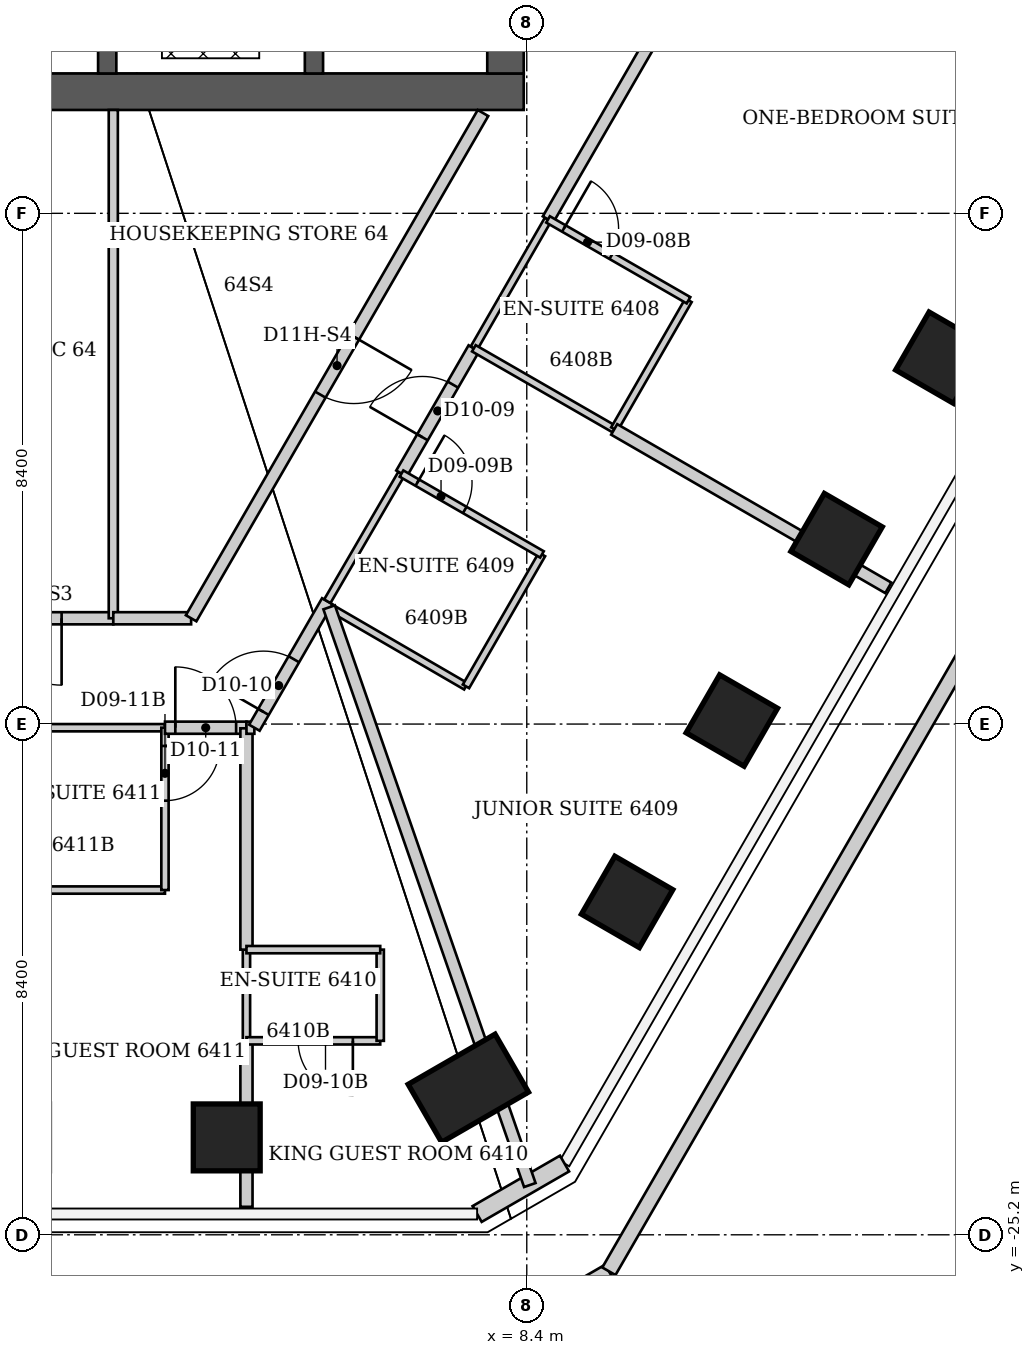
"""IFC4 building model, lengths in metres.
Left out: names, types, materials, properties, quantities, classifications, styles, units other than length and angle.
Written with IfcOpenShell. Run it as: python <this file> out.ifc"""

import sys

from ifc_helpers import new_model, si_unit, direction, frame, frame_2d, origin, origin_2d, place, context, subcontext, project, spatial, rectangle, extrude, clip, halfspace, element, fill, save


model = new_model("IFC4")
c1 = context("Model", 3, precision=1e-05, world=origin(), true_north=direction((0.0, 1.0)))
c2 = subcontext(c1, "Body", "Model", "MODEL_VIEW")
j1 = project(units=[si_unit("LENGTHUNIT", "METRE"), si_unit("PLANEANGLEUNIT", "RADIAN")], contexts=[c1])
p1 = place(None, origin())
s1 = spatial("IfcSite", under=j1, at=p1, CompositionType="ELEMENT")
p2 = place(p1, origin())
s2 = spatial("IfcBuilding", under=s1, at=p2, CompositionType="ELEMENT")
p3 = place(p2, frame((0.0, 0.0, 257.0)))
s3 = spatial("IfcBuildingStorey", under=s2, at=p3, CompositionType="ELEMENT", Elevation=257.0)
p4 = place(p3, frame((15.218, -10.775, -0.045), z_axis=(0.0, 0.0, 1.0), x_axis=(0.866025403784, -0.5, 0.0)))
e1 = element("IfcColumn", 1, at=p4, inside=s3, PredefinedType="COLUMN", context=c2, shape_type="SweptSolid", body=[
    clip(extrude(rectangle(XDim=1.1, YDim=1.1, at=origin_2d()), origin(), (0.0, 0.0, 1.0), 3.845), halfspace(frame((0.0, 0.0, 0.045)), True)),
])
p5 = place(p3, frame((13.495, -13.759, -0.052), z_axis=(0.0, 0.0, 1.0), x_axis=(0.866025403784, -0.5, 0.0)))
e2 = element("IfcColumn", 2, at=p5, inside=s3, PredefinedType="COLUMN", context=c2, shape_type="SweptSolid", body=[
    clip(extrude(rectangle(XDim=1.1, YDim=1.1, at=origin_2d()), origin(), (0.0, 0.0, 1.0), 3.852), halfspace(frame((0.0, 0.0, 0.052)), True)),
])
p6 = place(p3, frame((11.773, -16.742, -0.06), z_axis=(0.0, 0.0, 1.0), x_axis=(0.866025403784, -0.5, 0.0)))
e3 = element("IfcColumn", 3, at=p6, inside=s3, PredefinedType="COLUMN", context=c2, shape_type="SweptSolid", body=[
    clip(extrude(rectangle(XDim=1.1, YDim=1.1, at=origin_2d()), origin(), (0.0, 0.0, 1.0), 3.86), halfspace(frame((0.0, 0.0, 0.06)), True)),
])
p7 = place(p3, frame((10.05, -19.725, -0.067), z_axis=(0.0, 0.0, 1.0), x_axis=(0.866025403784, -0.5, 0.0)))
e4 = element("IfcColumn", 4, at=p7, inside=s3, PredefinedType="COLUMN", context=c2, shape_type="SweptSolid", body=[
    clip(extrude(rectangle(XDim=1.1, YDim=1.1, at=origin_2d()), origin(), (0.0, 0.0, 1.0), 3.867), halfspace(frame((0.0, 0.0, 0.067)), True)),
])
p8 = place(p3, frame((7.439, -22.79, -0.069), z_axis=(0.0, 0.0, 1.0), x_axis=(0.5, -0.866025403784, 0.0)))
e5 = element("IfcColumn", 5, at=p8, inside=s3, PredefinedType="COLUMN", context=c2, shape_type="SweptSolid", body=[
    clip(extrude(rectangle(XDim=1.1, YDim=1.65, at=origin_2d()), origin(), (0.0, 0.0, 1.0), 3.869), halfspace(frame((0.0, 0.0, 0.069)), True)),
])
p9 = place(p3, frame((3.466, -23.598, -0.059), z_axis=(0.0, 0.0, 1.0), x_axis=(0.0, -1.0, 0.0)))
e6 = element("IfcColumn", 6, at=p9, inside=s3, PredefinedType="COLUMN", context=c2, shape_type="SweptSolid", body=[
    clip(extrude(rectangle(XDim=1.1, YDim=1.1, at=origin_2d()), origin(), (0.0, 0.0, 1.0), 3.859), halfspace(frame((0.0, 0.0, 0.059)), True)),
])
p10 = place(p3, frame((-8.35, -6.4, 0.0), z_axis=(0.0, 0.0, 1.0), x_axis=(1.0, 0.0, 0.0)))
e7 = element("IfcWall", 7, at=p10, inside=s3, PredefinedType="SHEAR", context=c2, shape_type="SweptSolid", body=[
    extrude(rectangle(XDim=16.7, YDim=0.6, at=frame_2d((8.35, 0.0))), origin(), (0.0, 0.0, 1.0), 3.8),
])
p11 = place(p3, frame((8.05, -6.1, 0.0), z_axis=(0.0, 0.0, 1.0), x_axis=(0.0, 1.0, 0.0)))
e8 = element("IfcWall", 8, at=p11, inside=s3, PredefinedType="SHEAR", context=c2, shape_type="SweptSolid", body=[
    extrude(rectangle(XDim=12.2, YDim=0.6, at=frame_2d((6.1, 0.0))), origin(), (0.0, 0.0, 1.0), 3.8),
])
p12 = place(p11, frame((7.6, 0.0, 0.0)))
e9 = element("IfcOpeningElement", 9, at=p12, cuts=e8, PredefinedType="OPENING", context=c2, shape_type="SweptSolid", body=[
    extrude(rectangle(XDim=1.2, YDim=2.2, at=frame_2d((0.6, 1.1))), frame((0.0, 0.3, 0.0), z_axis=(0.0, -1.0, 0.0), x_axis=(1.0, 0.0, 0.0)), (0.0, 0.0, 1.0), 0.6),
])
for number, where, z_axis, x_axis in (
    (10, (1.5, -6.1, 0.0), (0.0, 0.0, 1.0), (0.0, 1.0, 0.0)),
    (11, (4.9, -6.1, 0.0), (0.0, 0.0, 1.0), (0.0, 1.0, 0.0)),
):
    element("IfcWall", number, at=place(p3, frame(where, z_axis=z_axis, x_axis=x_axis)), inside=s3, PredefinedType="SHEAR", context=c2, shape_type="SweptSolid", body=[
        extrude(rectangle(XDim=7.2, YDim=0.3, at=frame_2d((3.6, 0.0))), origin(), (0.0, 0.0, 1.0), 3.8),
    ])
p13 = place(p3, frame((9.021, -24.028, 0.0), z_axis=(0.0, 0.0, 1.0), x_axis=(-0.865989634427, -0.500061949227, 0.0)))
e12 = element("IfcWall", 12, at=p13, inside=s3, PredefinedType="SOLIDWALL", context=c2, shape_type="SweptSolid", body=[
    extrude(rectangle(XDim=1.66, YDim=0.3, at=frame_2d((0.83, 0.0))), origin(), (0.0, 0.0, 1.0), 3.64),
])
p14 = place(p3, frame((8.226, -26.682, 0.0), z_axis=(0.0, 0.0, 1.0), x_axis=(0.865508535391, 0.500894175615, 0.0)))
e13 = element("IfcWall", 13, at=p14, inside=s3, PredefinedType="PARAPET", context=c2, shape_type="SweptSolid", body=[
    extrude(rectangle(XDim=1.761, YDim=0.25, at=frame_2d((0.88, 0.0))), origin(), (0.0, 0.0, 1.0), 1.1),
])
p15 = place(p3, frame((9.75, -25.8, 0.0), z_axis=(0.0, 0.0, 1.0), x_axis=(0.499998496786, 0.866026271663, 0.0)))
e14 = element("IfcWall", 14, at=p15, inside=s3, PredefinedType="PARAPET", context=c2, shape_type="SweptSolid", body=[
    extrude(rectangle(XDim=34.936, YDim=0.25, at=frame_2d((17.468, 0.0))), origin(), (0.0, 0.0, 1.0), 1.1),
])
for number, where, z_axis, x_axis in (
    (15, (0.0, -19.53, 0.0), (0.0, 0.0, 1.0), (1.0, 0.0, 0.0)),
    (16, (0.0, -16.86, 0.0), (0.0, 0.0, 1.0), (1.0, 0.0, 0.0)),
):
    element("IfcWall", number, at=place(p3, frame(where, z_axis=z_axis, x_axis=x_axis)), inside=s3, PredefinedType="PARTITIONING", context=c2, shape_type="SweptSolid", body=[
        extrude(rectangle(XDim=2.45, YDim=0.12, at=frame_2d((1.225, 0.0))), origin(), (0.0, 0.0, 1.0), 3.64),
    ])
p16 = place(p3, frame((1.6, -15.06, 0.0), z_axis=(0.0, 0.0, 1.0), x_axis=(-1.0, 0.0, 0.0)))
e17 = element("IfcWall", 17, at=p16, inside=s3, PredefinedType="PARTITIONING", context=c2, shape_type="SweptSolid", body=[
    extrude(rectangle(XDim=2.8, YDim=0.2, at=frame_2d((1.4, 0.0))), origin(), (0.0, 0.0, 1.0), 3.64),
])
p17 = place(p16, frame((0.85, 0.0, 0.0)))
e18 = element("IfcOpeningElement", 18, at=p17, cuts=e17, PredefinedType="OPENING", context=c2, shape_type="SweptSolid", body=[
    extrude(rectangle(XDim=1.1, YDim=2.2, at=frame_2d((0.55, 1.1))), frame((0.0, 0.1, 0.0), z_axis=(0.0, -1.0, 0.0), x_axis=(1.0, 0.0, 0.0)), (0.0, 0.0, 1.0), 0.2),
])
p18 = place(p3, frame((1.6, -6.7, 0.0), z_axis=(0.0, 0.0, 1.0), x_axis=(0.0, -1.0, 0.0)))
e19 = element("IfcWall", 19, at=p18, inside=s3, PredefinedType="PARTITIONING", context=c2, shape_type="SweptSolid", body=[
    extrude(rectangle(XDim=8.36, YDim=0.15, at=frame_2d((4.18, 0.0))), origin(), (0.0, 0.0, 1.0), 2.86),
])
p19 = place(p3, frame((2.45, -19.53, 0.0), z_axis=(0.0, 0.0, 1.0), x_axis=(0.0, 1.0, 0.0)))
e20 = element("IfcWall", 20, at=p19, inside=s3, PredefinedType="PARTITIONING", context=c2, shape_type="SweptSolid", body=[
    extrude(rectangle(XDim=2.67, YDim=0.12, at=frame_2d((1.335, 0.0))), origin(), (0.0, 0.0, 1.0), 3.64),
])
p20 = place(p19, frame((1.47, 0.0, 0.0)))
e21 = element("IfcOpeningElement", 21, at=p20, cuts=e20, PredefinedType="OPENING", context=c2, shape_type="SweptSolid", body=[
    extrude(rectangle(XDim=0.9, YDim=2.03, at=frame_2d((0.45, 1.015))), frame((0.0, 0.06, 0.0), z_axis=(0.0, -1.0, 0.0), x_axis=(1.0, 0.0, 0.0)), (0.0, 0.0, 1.0), 0.12),
])
p21 = place(p3, frame((2.45, -16.86, 0.0), z_axis=(0.0, 0.0, 1.0), x_axis=(1.0, 0.0, 0.0)))
e22 = element("IfcWall", 22, at=p21, inside=s3, PredefinedType="PARTITIONING", context=c2, shape_type="SweptSolid", body=[
    extrude(rectangle(XDim=1.34, YDim=0.2, at=frame_2d((0.67, 0.0))), origin(), (0.0, 0.0, 1.0), 3.64),
])
p22 = place(p21, frame((0.17, 0.0, 0.0)))
e23 = element("IfcOpeningElement", 23, at=p22, cuts=e22, PredefinedType="OPENING", context=c2, shape_type="SweptSolid", body=[
    extrude(rectangle(XDim=1.0, YDim=2.13, at=frame_2d((0.5, 1.065))), frame((0.0, 0.1, 0.0), z_axis=(0.0, -1.0, 0.0), x_axis=(1.0, 0.0, 0.0)), (0.0, 0.0, 1.0), 0.2),
])
p23 = place(p3, frame((2.88, -15.06, 0.0), z_axis=(0.0, 0.0, 1.0), x_axis=(-1.0, 0.0, 0.0)))
e24 = element("IfcWall", 24, at=p23, inside=s3, PredefinedType="PARTITIONING", context=c2, shape_type="SweptSolid", body=[
    extrude(rectangle(XDim=1.28, YDim=0.2, at=frame_2d((0.64, 0.0))), origin(), (0.0, 0.0, 1.0), 3.64),
])
p24 = place(p3, frame((3.79, -24.74, 0.0), z_axis=(0.0, 0.0, 1.0), x_axis=(0.0, 1.0, 0.0)))
e25 = element("IfcWall", 25, at=p24, inside=s3, PredefinedType="PARTITIONING", context=c2, shape_type="SweptSolid", body=[
    extrude(rectangle(XDim=2.73, YDim=0.2, at=frame_2d((1.365, 0.0))), origin(), (0.0, 0.0, 1.0), 3.64),
])
p25 = place(p3, frame((3.79, -22.01, 0.0), z_axis=(0.0, 0.0, 1.0), x_axis=(0.0, 1.0, 0.0)))
e26 = element("IfcWall", 26, at=p25, inside=s3, PredefinedType="PARTITIONING", context=c2, shape_type="SweptSolid", body=[
    extrude(rectangle(XDim=1.5, YDim=0.12, at=frame_2d((0.75, 0.0))), origin(), (0.0, 0.0, 1.0), 3.64),
])
p26 = place(p3, frame((3.79, -22.01, 0.0), z_axis=(0.0, 0.0, 1.0), x_axis=(1.0, 0.0, 0.0)))
e27 = element("IfcWall", 27, at=p26, inside=s3, PredefinedType="PARTITIONING", context=c2, shape_type="SweptSolid", body=[
    extrude(rectangle(XDim=2.2, YDim=0.12, at=frame_2d((1.1, 0.0))), origin(), (0.0, 0.0, 1.0), 3.64),
])
p27 = place(p26, frame((0.85, 0.0, 0.0)))
e28 = element("IfcOpeningElement", 28, at=p27, cuts=e27, PredefinedType="OPENING", context=c2, shape_type="SweptSolid", body=[
    extrude(rectangle(XDim=0.9, YDim=2.03, at=frame_2d((0.45, 1.015))), frame((0.0, 0.06, 0.0), z_axis=(0.0, -1.0, 0.0), x_axis=(1.0, 0.0, 0.0)), (0.0, 0.0, 1.0), 0.12),
])
p28 = place(p3, frame((3.79, -20.51, 0.0), z_axis=(0.0, 0.0, 1.0), x_axis=(0.0, 1.0, 0.0)))
e29 = element("IfcWall", 29, at=p28, inside=s3, PredefinedType="PARTITIONING", context=c2, shape_type="SweptSolid", body=[
    extrude(rectangle(XDim=3.64, YDim=0.2, at=frame_2d((1.82, 0.0))), origin(), (0.0, 0.0, 1.0), 3.64),
])
p29 = place(p3, frame((3.79, -16.86, 0.0), z_axis=(0.0, 0.0, 1.0), x_axis=(1.0, 0.0, 0.0)))
e30 = element("IfcWall", 30, at=p29, inside=s3, PredefinedType="PARTITIONING", context=c2, shape_type="SweptSolid", body=[
    extrude(rectangle(XDim=0.13, YDim=0.2, at=frame_2d((0.065, 0.0))), origin(), (0.0, 0.0, 1.0), 3.64),
])
p30 = place(p3, frame((3.92, -16.86, 0.0), z_axis=(0.0, 0.0, 1.0), x_axis=(0.499693115345, 0.866202511239, 0.0)))
e31 = element("IfcWall", 31, at=p30, inside=s3, PredefinedType="PARTITIONING", context=c2, shape_type="SweptSolid", body=[
    extrude(rectangle(XDim=2.401, YDim=0.2, at=frame_2d((1.201, 0.0))), origin(), (0.0, 0.0, 1.0), 3.64),
])
p31 = place(p30, frame((0.3, 0.0, 0.0)))
e32 = element("IfcOpeningElement", 32, at=p31, cuts=e31, PredefinedType="OPENING", context=c2, shape_type="SweptSolid", body=[
    extrude(rectangle(XDim=1.0, YDim=2.13, at=frame_2d((0.5, 1.065))), frame((0.0, 0.1, 0.0), z_axis=(0.0, -1.0, 0.0), x_axis=(1.0, 0.0, 0.0)), (0.0, 0.0, 1.0), 0.2),
])
p32 = place(p3, frame((5.12, -14.78, 0.0), z_axis=(0.0, 0.0, 1.0), x_axis=(0.502307685327, 0.86468895521, 0.0)))
e33 = element("IfcWall", 33, at=p32, inside=s3, PredefinedType="PARTITIONING", context=c2, shape_type="SweptSolid", body=[
    extrude(rectangle(XDim=2.429, YDim=0.12, at=frame_2d((1.214, 0.0))), origin(), (0.0, 0.0, 1.0), 3.64),
])
p33 = place(p3, frame((5.233, -14.923, 0.0), z_axis=(0.0, 0.0, 1.0), x_axis=(0.864900876675, -0.501942699445, 0.0)))
e34 = element("IfcWall", 34, at=p33, inside=s3, PredefinedType="PARTITIONING", context=c2, shape_type="SweptSolid", body=[
    extrude(rectangle(XDim=2.505, YDim=0.12, at=frame_2d((1.252, 0.0))), origin(), (0.0, 0.0, 1.0), 3.038),
])
p34 = place(p3, frame((5.99, -22.01, 0.0), z_axis=(0.0, 0.0, 1.0), x_axis=(0.0, 1.0, 0.0)))
e35 = element("IfcWall", 35, at=p34, inside=s3, PredefinedType="PARTITIONING", context=c2, shape_type="SweptSolid", body=[
    extrude(rectangle(XDim=1.5, YDim=0.12, at=frame_2d((0.75, 0.0))), origin(), (0.0, 0.0, 1.0), 3.64),
])
p35 = place(p3, frame((5.99, -20.51, 0.0), z_axis=(0.0, 0.0, 1.0), x_axis=(-1.0, 0.0, 0.0)))
e36 = element("IfcWall", 36, at=p35, inside=s3, PredefinedType="PARTITIONING", context=c2, shape_type="SweptSolid", body=[
    extrude(rectangle(XDim=2.2, YDim=0.12, at=frame_2d((1.1, 0.0))), origin(), (0.0, 0.0, 1.0), 3.64),
])
p36 = place(p3, frame((6.34, -12.68, 0.0), z_axis=(0.0, 0.0, 1.0), x_axis=(0.500222880675, 0.865896685321, 0.0)))
e37 = element("IfcWall", 37, at=p36, inside=s3, PredefinedType="PARTITIONING", context=c2, shape_type="SweptSolid", body=[
    extrude(rectangle(XDim=2.379, YDim=0.2, at=frame_2d((1.189, 0.0))), origin(), (0.0, 0.0, 1.0), 3.64),
])
p37 = place(p36, frame((0.689, 0.0, 0.0)))
e38 = element("IfcOpeningElement", 38, at=p37, cuts=e37, PredefinedType="OPENING", context=c2, shape_type="SweptSolid", body=[
    extrude(rectangle(XDim=1.0, YDim=2.13, at=frame_2d((0.5, 1.065))), frame((0.0, 0.1, 0.0), z_axis=(0.0, -1.0, 0.0), x_axis=(1.0, 0.0, 0.0)), (0.0, 0.0, 1.0), 0.2),
])
p38 = place(p3, frame((7.4, -16.18, 0.0), z_axis=(0.0, 0.0, 1.0), x_axis=(0.499159685399, 0.866510016372, 0.0)))
e39 = element("IfcWall", 39, at=p38, inside=s3, PredefinedType="PARTITIONING", context=c2, shape_type="SweptSolid", body=[
    extrude(rectangle(XDim=2.504, YDim=0.12, at=frame_2d((1.252, 0.0))), origin(), (0.0, 0.0, 1.0), 3.64),
])
p39 = place(p3, frame((7.53, -10.62, 0.0), z_axis=(0.0, 0.0, 1.0), x_axis=(0.498748634132, 0.866746675766, 0.0)))
e40 = element("IfcWall", 40, at=p39, inside=s3, PredefinedType="PARTITIONING", context=c2, shape_type="SweptSolid", body=[
    extrude(rectangle(XDim=2.446, YDim=0.12, at=frame_2d((1.223, 0.0))), origin(), (0.0, 0.0, 1.0), 3.64),
])
p40 = place(p3, frame((7.53, -10.62, 0.0), z_axis=(0.0, 0.0, 1.0), x_axis=(0.866654860089, -0.498908161372, 0.0)))
e41 = element("IfcWall", 41, at=p40, inside=s3, PredefinedType="PARTITIONING", context=c2, shape_type="SweptSolid", body=[
    extrude(rectangle(XDim=2.666, YDim=0.12, at=frame_2d((1.333, 0.0))), origin(), (0.0, 0.0, 1.0), 3.64),
])
p41 = place(p3, frame((7.68, -6.75, 0.0), z_axis=(0.0, 0.0, 1.0), x_axis=(-0.500174600737, -0.865924574532, 0.0)))
e42 = element("IfcWall", 42, at=p41, inside=s3, PredefinedType="PARTITIONING", context=c2, shape_type="SweptSolid", body=[
    extrude(rectangle(XDim=9.597, YDim=0.2, at=frame_2d((4.798, 0.0))), origin(), (0.0, 0.0, 1.0), 3.64),
])
p42 = place(p41, frame((4.248, 0.0, 0.0)))
e43 = element("IfcOpeningElement", 43, at=p42, cuts=e42, PredefinedType="OPENING", context=c2, shape_type="SweptSolid", body=[
    extrude(rectangle(XDim=1.1, YDim=2.2, at=frame_2d((0.55, 1.1))), frame((0.0, 0.1, 0.0), z_axis=(0.0, -1.0, 0.0), x_axis=(1.0, 0.0, 0.0)), (0.0, 0.0, 1.0), 0.2),
])
p43 = place(p3, frame((8.45, -24.382, 0.0), z_axis=(0.0, 0.0, 1.0), x_axis=(-0.328108256954, 0.944640128154, 0.0)))
e44 = element("IfcWall", 44, at=p43, inside=s3, PredefinedType="PARTITIONING", context=c2, shape_type="SweptSolid", body=[
    extrude(rectangle(XDim=10.059, YDim=0.2, at=frame_2d((5.029, 0.0))), origin(), (0.0, 0.0, 1.0), 3.64),
])
p44 = place(p3, frame((8.65, -14.01, 0.0), z_axis=(0.0, 0.0, 1.0), x_axis=(-0.866592449628, 0.499016559092, 0.0)))
e45 = element("IfcWall", 45, at=p44, inside=s3, PredefinedType="PARTITIONING", context=c2, shape_type="SweptSolid", body=[
    extrude(rectangle(XDim=2.665, YDim=0.12, at=frame_2d((1.333, 0.0))), origin(), (0.0, 0.0, 1.0), 3.64),
])
p45 = place(p44, frame((1.466, 0.0, 0.0)))
e46 = element("IfcOpeningElement", 46, at=p45, cuts=e45, PredefinedType="OPENING", context=c2, shape_type="SweptSolid", body=[
    extrude(rectangle(XDim=0.9, YDim=2.03, at=frame_2d((0.45, 1.015))), frame((0.0, 0.06, 0.0), z_axis=(0.0, -1.0, 0.0), x_axis=(1.0, 0.0, 0.0)), (0.0, 0.0, 1.0), 0.12),
])
p46 = place(p3, frame((8.75, -8.5, 0.0), z_axis=(0.0, 0.0, 1.0), x_axis=(0.500093981358, 0.865971136822, 0.0)))
e47 = element("IfcWall", 47, at=p46, inside=s3, PredefinedType="PARTITIONING", context=c2, shape_type="SweptSolid", body=[
    extrude(rectangle(XDim=8.418, YDim=0.2, at=frame_2d((4.209, 0.0))), origin(), (0.0, 0.0, 1.0), 3.64),
])
p47 = place(p46, frame((3.709, 0.0, 0.0)))
e48 = element("IfcOpeningElement", 48, at=p47, cuts=e47, PredefinedType="OPENING", context=c2, shape_type="SweptSolid", body=[
    extrude(rectangle(XDim=1.0, YDim=2.13, at=frame_2d((0.5, 1.065))), frame((0.0, 0.1, 0.0), z_axis=(0.0, -1.0, 0.0), x_axis=(1.0, 0.0, 0.0)), (0.0, 0.0, 1.0), 0.2),
])
p48 = place(p3, frame((9.84, -11.95, 0.0), z_axis=(0.0, 0.0, 1.0), x_axis=(0.498791783817, 0.866721844883, 0.0)))
e49 = element("IfcWall", 49, at=p48, inside=s3, PredefinedType="PARTITIONING", context=c2, shape_type="SweptSolid", body=[
    extrude(rectangle(XDim=2.446, YDim=0.12, at=frame_2d((1.223, 0.0))), origin(), (0.0, 0.0, 1.0), 3.64),
])
p49 = place(p3, frame((11.06, -9.83, 0.0), z_axis=(0.0, 0.0, 1.0), x_axis=(-0.866615255992, 0.498976951453, 0.0)))
e50 = element("IfcWall", 50, at=p49, inside=s3, PredefinedType="PARTITIONING", context=c2, shape_type="SweptSolid", body=[
    extrude(rectangle(XDim=2.666, YDim=0.12, at=frame_2d((1.333, 0.0))), origin(), (0.0, 0.0, 1.0), 3.64),
])
p50 = place(p49, frame((1.466, 0.0, 0.0)))
e51 = element("IfcOpeningElement", 51, at=p50, cuts=e50, PredefinedType="OPENING", context=c2, shape_type="SweptSolid", body=[
    extrude(rectangle(XDim=0.9, YDim=2.03, at=frame_2d((0.45, 1.015))), frame((0.0, 0.06, 0.0), z_axis=(0.0, -1.0, 0.0), x_axis=(1.0, 0.0, 0.0)), (0.0, 0.0, 1.0), 0.12),
])
p51 = place(p3, frame((14.346, -14.56, 0.0), z_axis=(0.0, 0.0, 1.0), x_axis=(-0.86575990496, 0.500459575754, 0.0)))
e52 = element("IfcWall", 52, at=p51, inside=s3, PredefinedType="PARTITIONING", context=c2, shape_type="SweptSolid", body=[
    extrude(rectangle(XDim=5.208, YDim=0.2, at=frame_2d((2.604, 0.0))), origin(), (0.0, 0.0, 1.0), 3.64),
])
p52 = place(p50, origin())
e53 = element("IfcDoor", 53, at=p52, inside=s3, OperationType="SINGLE_SWING_RIGHT", PredefinedType="DOOR", context=c2, shape_type="SweptSolid", body=[
    extrude(rectangle(XDim=0.9, YDim=2.03, at=frame_2d((0.45, 1.015))), frame((0.0, 0.025, 0.0), z_axis=(0.0, -1.0, 0.0), x_axis=(1.0, 0.0, 0.0)), (0.0, 0.0, 1.0), 0.05),
])
fill(e51, e53)
p53 = place(p37, origin())
e54 = element("IfcDoor", 54, at=p53, inside=s3, OperationType="SINGLE_SWING_LEFT", PredefinedType="DOOR", context=c2, shape_type="SweptSolid", body=[
    extrude(rectangle(XDim=1.0, YDim=2.13, at=frame_2d((0.5, 1.065))), frame((0.0, 0.025, 0.0), z_axis=(0.0, -1.0, 0.0), x_axis=(1.0, 0.0, 0.0)), (0.0, 0.0, 1.0), 0.05),
])
fill(e38, e54)
p54 = place(p45, origin())
e55 = element("IfcDoor", 55, at=p54, inside=s3, OperationType="SINGLE_SWING_RIGHT", PredefinedType="DOOR", context=c2, shape_type="SweptSolid", body=[
    extrude(rectangle(XDim=0.9, YDim=2.03, at=frame_2d((0.45, 1.015))), frame((0.0, 0.025, 0.0), z_axis=(0.0, -1.0, 0.0), x_axis=(1.0, 0.0, 0.0)), (0.0, 0.0, 1.0), 0.05),
])
fill(e46, e55)
p55 = place(p31, origin())
e56 = element("IfcDoor", 56, at=p55, inside=s3, OperationType="SINGLE_SWING_LEFT", PredefinedType="DOOR", context=c2, shape_type="SweptSolid", body=[
    extrude(rectangle(XDim=1.0, YDim=2.13, at=frame_2d((0.5, 1.065))), frame((0.0, 0.025, 0.0), z_axis=(0.0, -1.0, 0.0), x_axis=(1.0, 0.0, 0.0)), (0.0, 0.0, 1.0), 0.05),
])
fill(e32, e56)
p56 = place(p27, origin())
e57 = element("IfcDoor", 57, at=p56, inside=s3, OperationType="SINGLE_SWING_RIGHT", PredefinedType="DOOR", context=c2, shape_type="SweptSolid", body=[
    extrude(rectangle(XDim=0.9, YDim=2.03, at=frame_2d((0.45, 1.015))), frame((0.0, 0.025, 0.0), z_axis=(0.0, -1.0, 0.0), x_axis=(1.0, 0.0, 0.0)), (0.0, 0.0, 1.0), 0.05),
])
fill(e28, e57)
p57 = place(p22, origin())
e58 = element("IfcDoor", 58, at=p57, inside=s3, OperationType="SINGLE_SWING_LEFT", PredefinedType="DOOR", context=c2, shape_type="SweptSolid", body=[
    extrude(rectangle(XDim=1.0, YDim=2.13, at=frame_2d((0.5, 1.065))), frame((0.0, 0.025, 0.0), z_axis=(0.0, -1.0, 0.0), x_axis=(1.0, 0.0, 0.0)), (0.0, 0.0, 1.0), 0.05),
])
fill(e23, e58)
p58 = place(p20, origin())
e59 = element("IfcDoor", 59, at=p58, inside=s3, OperationType="SINGLE_SWING_RIGHT", PredefinedType="DOOR", context=c2, shape_type="SweptSolid", body=[
    extrude(rectangle(XDim=0.9, YDim=2.03, at=frame_2d((0.45, 1.015))), frame((0.0, 0.025, 0.0), z_axis=(0.0, -1.0, 0.0), x_axis=(1.0, 0.0, 0.0)), (0.0, 0.0, 1.0), 0.05),
])
fill(e21, e59)
p59 = place(p17, origin())
e60 = element("IfcDoor", 60, at=p59, inside=s3, OperationType="SINGLE_SWING_LEFT", PredefinedType="DOOR", context=c2, shape_type="SweptSolid", body=[
    extrude(rectangle(XDim=1.1, YDim=2.2, at=frame_2d((0.55, 1.1))), frame((0.0, 0.025, 0.0), z_axis=(0.0, -1.0, 0.0), x_axis=(1.0, 0.0, 0.0)), (0.0, 0.0, 1.0), 0.05),
])
fill(e18, e60)
p60 = place(p42, origin())
e61 = element("IfcDoor", 61, at=p60, inside=s3, OperationType="SINGLE_SWING_LEFT", PredefinedType="DOOR", context=c2, shape_type="SweptSolid", body=[
    extrude(rectangle(XDim=1.1, YDim=2.2, at=frame_2d((0.55, 1.1))), frame((0.0, 0.025, 0.0), z_axis=(0.0, -1.0, 0.0), x_axis=(1.0, 0.0, 0.0)), (0.0, 0.0, 1.0), 0.05),
])
fill(e43, e61)
save(model, sys.argv[1])
